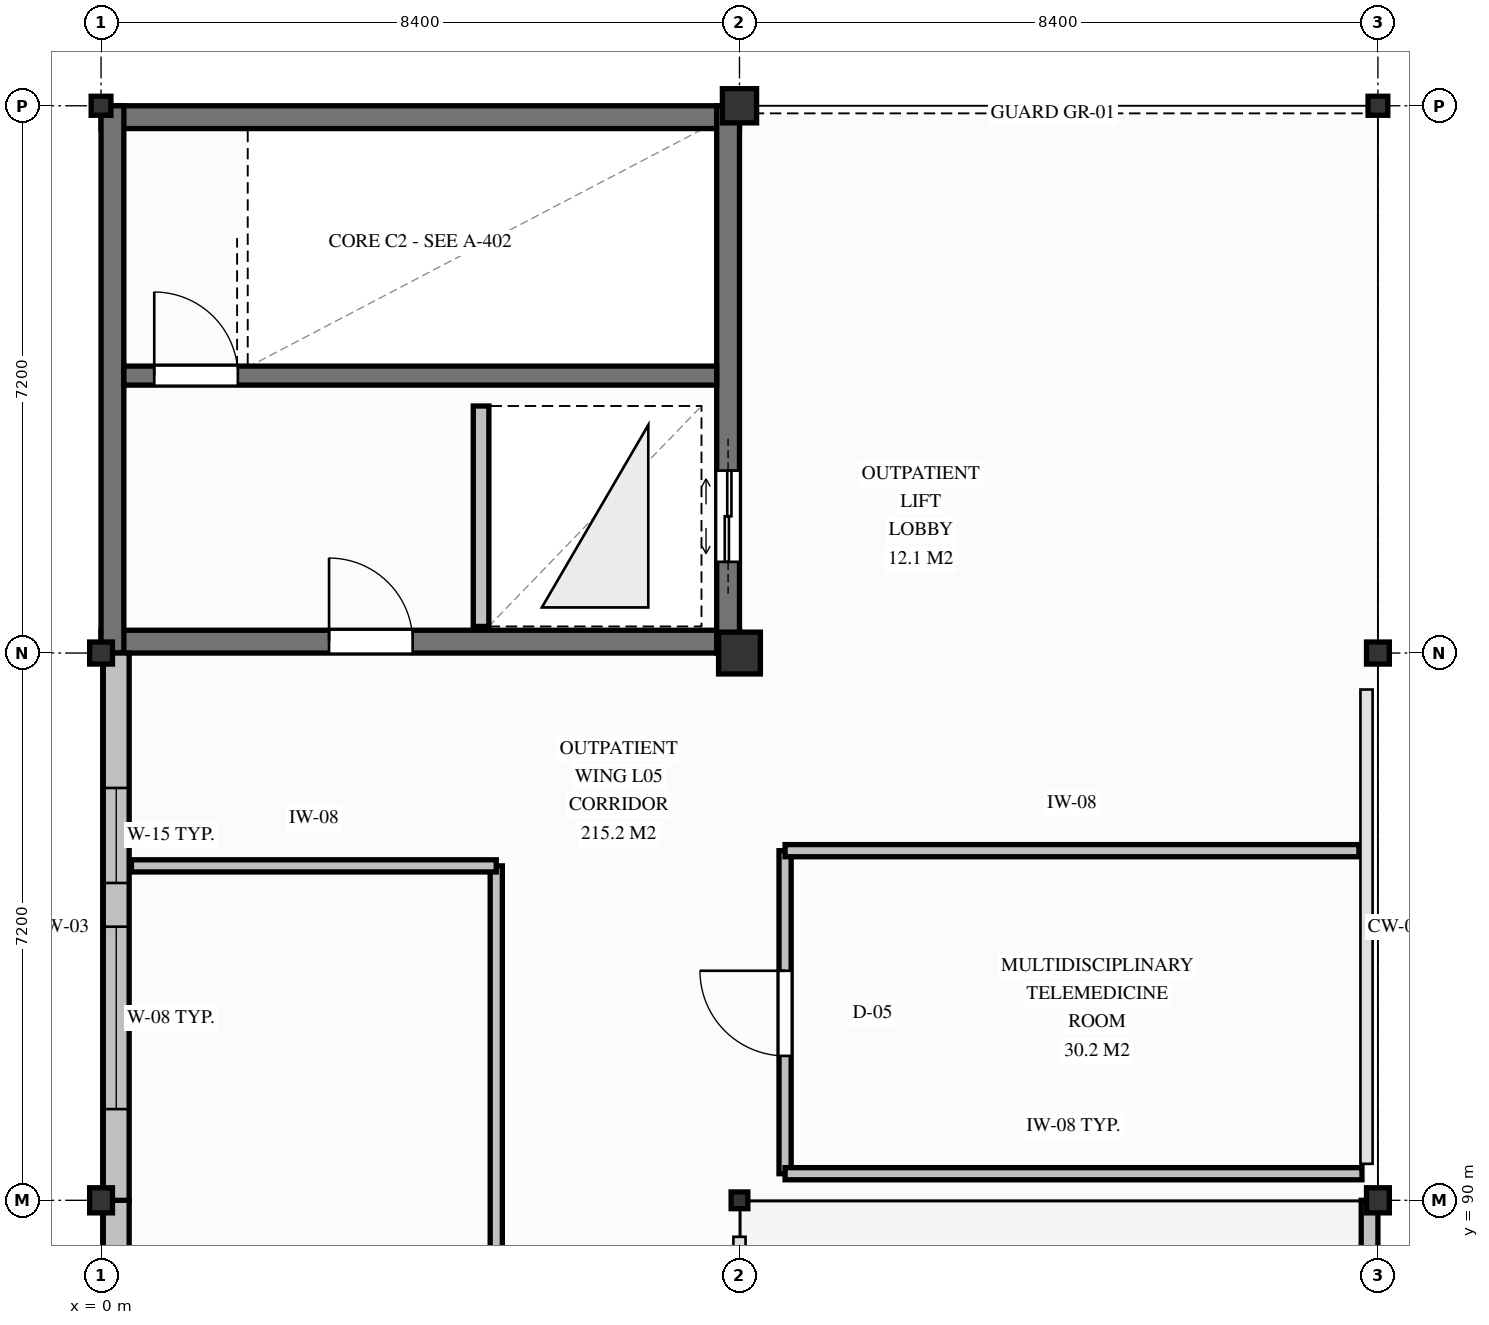
"""IFC4 building model, lengths in metres.
Left out: names, types, materials, properties, quantities, classifications, styles, units other than length and angle.
Written with IfcOpenShell. Run it as: python <this file> out.ifc"""

import sys

from ifc_helpers import new_model, si_unit, direction, frame, frame_2d, origin, origin_2d, place, context, subcontext, project, spatial, rectangle, hollow_rectangle, i_section, extrude, element, fill, save


model = new_model("IFC4")
c1 = context("Model", 3, precision=1e-05, world=origin(), true_north=direction((0.0, 1.0)))
c2 = subcontext(c1, "Body", "Model", "MODEL_VIEW")
j1 = project(units=[si_unit("LENGTHUNIT", "METRE"), si_unit("PLANEANGLEUNIT", "RADIAN")], contexts=[c1])
p1 = place(None, origin())
s1 = spatial("IfcSite", under=j1, at=p1, CompositionType="ELEMENT")
p2 = place(p1, origin())
s2 = spatial("IfcBuilding", under=s1, at=p2, CompositionType="ELEMENT")
p3 = place(p2, frame((0.0, 0.0, 21.3)))
s3 = spatial("IfcBuildingStorey", under=s2, at=p3, CompositionType="ELEMENT", Elevation=21.3)
p4 = place(p3, frame((0.0, 104.25, 0.0), z_axis=(0.0, 0.0, 1.0), x_axis=(1.0, 0.0, 0.0)))
e1 = element("IfcWall", 1, at=p4, inside=s3, PredefinedType="SHEAR", context=c2, shape_type="SweptSolid", body=[
    extrude(rectangle(XDim=8.4, YDim=0.3, at=frame_2d((4.2, 0.0))), origin(), (0.0, 0.0, 1.0), 5.15),
])
p5 = place(p3, frame((0.0, 97.35, 0.0), z_axis=(0.0, 0.0, 1.0), x_axis=(1.0, 0.0, 0.0)))
e2 = element("IfcWall", 2, at=p5, inside=s3, PredefinedType="SHEAR", context=c2, shape_type="SweptSolid", body=[
    extrude(rectangle(XDim=8.4, YDim=0.3, at=frame_2d((4.2, 0.0))), origin(), (0.0, 0.0, 1.0), 5.15),
])
p6 = place(p5, frame((3.0, 0.0, 0.0)))
e3 = element("IfcOpeningElement", 3, at=p6, cuts=e2, PredefinedType="OPENING", context=c2, shape_type="SweptSolid", body=[
    extrude(rectangle(XDim=1.1, YDim=2.15, at=frame_2d((0.55, 1.075))), frame((0.0, 0.16, 0.0), z_axis=(0.0, -1.0, 0.0), x_axis=(1.0, 0.0, 0.0)), (0.0, 0.0, 1.0), 0.32),
])
p7 = place(p3, frame((0.15, 97.2, 0.0), z_axis=(0.0, 0.0, 1.0), x_axis=(0.0, 1.0, 0.0)))
e4 = element("IfcWall", 4, at=p7, inside=s3, PredefinedType="SHEAR", context=c2, shape_type="SweptSolid", body=[
    extrude(rectangle(XDim=7.2, YDim=0.3, at=frame_2d((3.6, 0.0))), origin(), (0.0, 0.0, 1.0), 5.15),
])
p8 = place(p3, frame((8.25, 97.2, 0.0), z_axis=(0.0, 0.0, 1.0), x_axis=(0.0, 1.0, 0.0)))
e5 = element("IfcWall", 5, at=p8, inside=s3, PredefinedType="SHEAR", context=c2, shape_type="SweptSolid", body=[
    extrude(rectangle(XDim=7.2, YDim=0.3, at=frame_2d((3.6, 0.0))), origin(), (0.0, 0.0, 1.0), 5.15),
])
p9 = place(p8, frame((1.2, 0.0, 0.0)))
e6 = element("IfcOpeningElement", 6, at=p9, cuts=e5, PredefinedType="OPENING", context=c2, shape_type="SweptSolid", body=[
    extrude(rectangle(XDim=1.2, YDim=2.15, at=frame_2d((0.6, 1.075))), frame((0.0, 0.16, 0.0), z_axis=(0.0, -1.0, 0.0), x_axis=(1.0, 0.0, 0.0)), (0.0, 0.0, 1.0), 0.32),
])
p10 = place(p3, frame((0.3, 100.85, 0.0), z_axis=(0.0, 0.0, 1.0), x_axis=(1.0, 0.0, 0.0)))
e7 = element("IfcWall", 7, at=p10, inside=s3, PredefinedType="SHEAR", context=c2, shape_type="SweptSolid", body=[
    extrude(rectangle(XDim=7.8, YDim=0.25, at=frame_2d((3.9, 0.0))), origin(), (0.0, 0.0, 1.0), 5.15),
])
p11 = place(p10, frame((0.4, 0.0, 0.0)))
e8 = element("IfcOpeningElement", 8, at=p11, cuts=e7, PredefinedType="OPENING", context=c2, shape_type="SweptSolid", body=[
    extrude(rectangle(XDim=1.1, YDim=2.15, at=frame_2d((0.55, 1.075))), frame((0.0, 0.135, 0.0), z_axis=(0.0, -1.0, 0.0), x_axis=(1.0, 0.0, 0.0)), (0.0, 0.0, 1.0), 0.27),
])
p12 = place(p3, frame((0.0, 90.0, 0.0), z_axis=(0.0, 0.0, 1.0), x_axis=(1.0, 0.0, 0.0)))
e9 = element("IfcColumn", 9, at=p12, inside=s3, PredefinedType="COLUMN", context=c2, shape_type="SweptSolid", body=[
    extrude(i_section(OverallWidth=0.3, OverallDepth=0.33, WebThickness=0.01, FlangeThickness=0.017, FilletRadius=0.027, at=origin_2d()), origin(), (0.0, 0.0, 1.0), 4.05),
])
p13 = place(p3, frame((0.0, 97.2, 0.0), z_axis=(0.0, 0.0, 1.0), x_axis=(1.0, 0.0, 0.0)))
e10 = element("IfcColumn", 10, at=p13, inside=s3, PredefinedType="COLUMN", context=c2, shape_type="SweptSolid", body=[
    extrude(i_section(OverallWidth=0.3, OverallDepth=0.29, WebThickness=0.009, FlangeThickness=0.014, FilletRadius=0.027, at=origin_2d()), origin(), (0.0, 0.0, 1.0), 4.05),
])
p14 = place(p3, frame((0.0, 104.4, 0.0), z_axis=(0.0, 0.0, 1.0), x_axis=(1.0, 0.0, 0.0)))
e11 = element("IfcColumn", 11, at=p14, inside=s3, PredefinedType="COLUMN", context=c2, shape_type="SweptSolid", body=[
    extrude(i_section(OverallWidth=0.26, OverallDepth=0.25, WebThickness=0.008, FlangeThickness=0.012, FilletRadius=0.024, at=origin_2d()), origin(), (0.0, 0.0, 1.0), 4.05),
])
p15 = place(p3, frame((8.4, 90.0, 0.0), z_axis=(0.0, 0.0, 1.0), x_axis=(1.0, 0.0, 0.0)))
e12 = element("IfcColumn", 12, at=p15, inside=s3, PredefinedType="COLUMN", context=c2, shape_type="SweptSolid", body=[
    extrude(hollow_rectangle(XDim=0.22, YDim=0.22, WallThickness=0.012, InnerFilletRadius=0.019, OuterFilletRadius=0.031, at=origin_2d()), origin(), (0.0, 0.0, 1.0), 4.05),
])
p16 = place(p3, frame((8.4, 97.2, 0.0), z_axis=(0.0, 0.0, 1.0), x_axis=(1.0, 0.0, 0.0)))
e13 = element("IfcColumn", 13, at=p16, inside=s3, PredefinedType="COLUMN", context=c2, shape_type="SweptSolid", body=[
    extrude(rectangle(XDim=0.55, YDim=0.55, at=origin_2d()), origin(), (0.0, 0.0, 1.0), 4.05),
])
p17 = place(p3, frame((8.4, 104.4, 0.0), z_axis=(0.0, 0.0, 1.0), x_axis=(1.0, 0.0, 0.0)))
e14 = element("IfcColumn", 14, at=p17, inside=s3, PredefinedType="COLUMN", context=c2, shape_type="SweptSolid", body=[
    extrude(rectangle(XDim=0.45, YDim=0.45, at=origin_2d()), origin(), (0.0, 0.0, 1.0), 4.05),
])
p18 = place(p3, frame((16.8, 90.0, 0.0), z_axis=(0.0, 0.0, 1.0), x_axis=(1.0, 0.0, 0.0)))
e15 = element("IfcColumn", 15, at=p18, inside=s3, PredefinedType="COLUMN", context=c2, shape_type="SweptSolid", body=[
    extrude(i_section(OverallWidth=0.3, OverallDepth=0.33, WebThickness=0.01, FlangeThickness=0.017, FilletRadius=0.027, at=origin_2d()), origin(), (0.0, 0.0, 1.0), 4.05),
])
p19 = place(p3, frame((16.8, 97.2, 0.0), z_axis=(0.0, 0.0, 1.0), x_axis=(1.0, 0.0, 0.0)))
e16 = element("IfcColumn", 16, at=p19, inside=s3, PredefinedType="COLUMN", context=c2, shape_type="SweptSolid", body=[
    extrude(i_section(OverallWidth=0.3, OverallDepth=0.29, WebThickness=0.009, FlangeThickness=0.014, FilletRadius=0.027, at=origin_2d()), origin(), (0.0, 0.0, 1.0), 4.05),
])
p20 = place(p3, frame((16.8, 104.4, 0.0), z_axis=(0.0, 0.0, 1.0), x_axis=(1.0, 0.0, 0.0)))
e17 = element("IfcColumn", 17, at=p20, inside=s3, PredefinedType="COLUMN", context=c2, shape_type="SweptSolid", body=[
    extrude(i_section(OverallWidth=0.26, OverallDepth=0.25, WebThickness=0.008, FlangeThickness=0.012, FilletRadius=0.024, at=origin_2d()), origin(), (0.0, 0.0, 1.0), 4.05),
])
p21 = place(p3, frame((0.2, 82.8, 0.0), z_axis=(0.0, 0.0, 1.0), x_axis=(0.0, 1.0, 0.0)))
e18 = element("IfcWall", 18, at=p21, inside=s3, PredefinedType="SOLIDWALL", context=c2, shape_type="SweptSolid", body=[
    extrude(rectangle(XDim=7.2, YDim=0.34, at=frame_2d((3.6, 0.0))), origin(), (0.0, 0.0, 1.0), 3.338),
])
p22 = place(p21, frame((1.35, 0.0, 0.85)))
e19 = element("IfcOpeningElement", 19, at=p22, cuts=e18, PredefinedType="OPENING", context=c2, shape_type="SweptSolid", body=[
    extrude(rectangle(XDim=2.1, YDim=2.0, at=frame_2d((1.05, 1.0))), frame((0.0, 0.18, 0.0), z_axis=(0.0, -1.0, 0.0), x_axis=(1.0, 0.0, 0.0)), (0.0, 0.0, 1.0), 0.36),
])
p23 = place(p3, frame((0.2, 90.0, 0.0), z_axis=(0.0, 0.0, 1.0), x_axis=(0.0, 1.0, 0.0)))
e20 = element("IfcWall", 20, at=p23, inside=s3, PredefinedType="SOLIDWALL", context=c2, shape_type="SweptSolid", body=[
    extrude(rectangle(XDim=7.2, YDim=0.34, at=frame_2d((3.6, 0.0))), origin(), (0.0, 0.0, 1.0), 3.338),
])
p24 = place(p23, frame((1.2, 0.0, 0.85)))
e21 = element("IfcOpeningElement", 21, at=p24, cuts=e20, PredefinedType="OPENING", context=c2, shape_type="SweptSolid", body=[
    extrude(rectangle(XDim=2.4, YDim=2.05, at=frame_2d((1.2, 1.025))), frame((0.0, 0.18, 0.0), z_axis=(0.0, -1.0, 0.0), x_axis=(1.0, 0.0, 0.0)), (0.0, 0.0, 1.0), 0.36),
])
p25 = place(p23, frame((4.175, 0.0, 0.85)))
e22 = element("IfcOpeningElement", 22, at=p25, cuts=e20, PredefinedType="OPENING", context=c2, shape_type="SweptSolid", body=[
    extrude(rectangle(XDim=1.25, YDim=1.5, at=frame_2d((0.625, 0.75))), frame((0.0, 0.18, 0.0), z_axis=(0.0, -1.0, 0.0), x_axis=(1.0, 0.0, 0.0)), (0.0, 0.0, 1.0), 0.36),
])
p26 = place(p3, frame((5.0, 97.55, 0.0), z_axis=(0.0, 0.0, 1.0), x_axis=(0.0, 1.0, 0.0)))
e23 = element("IfcWall", 23, at=p26, inside=s3, PredefinedType="PARTITIONING", context=c2, shape_type="SweptSolid", body=[
    extrude(rectangle(XDim=2.9, YDim=0.205, at=frame_2d((1.45, 0.0))), origin(), (0.0, 0.0, 1.0), 3.78),
])
p27 = place(p3, frame((9.0, 90.35, 0.0), z_axis=(0.0, 0.0, 1.0), x_axis=(0.0, 1.0, 0.0)))
e24 = element("IfcWall", 24, at=p27, inside=s3, PredefinedType="PARTITIONING", context=c2, shape_type="SweptSolid", body=[
    extrude(rectangle(XDim=4.25, YDim=0.16, at=frame_2d((2.125, 0.0))), origin(), (0.0, 0.0, 1.0), 3.78),
])
p28 = place(p27, frame((1.55, 0.0, 0.0)))
e25 = element("IfcOpeningElement", 25, at=p28, cuts=e24, PredefinedType="OPENING", context=c2, shape_type="SweptSolid", body=[
    extrude(rectangle(XDim=1.12, YDim=2.18, at=frame_2d((0.56, 1.09))), frame((0.0, 0.09, 0.0), z_axis=(0.0, -1.0, 0.0), x_axis=(1.0, 0.0, 0.0)), (0.0, 0.0, 1.0), 0.18),
])
p29 = place(p3, frame((9.0, 90.35, 0.0), z_axis=(0.0, 0.0, 1.0), x_axis=(1.0, 0.0, 0.0)))
e26 = element("IfcWall", 26, at=p29, inside=s3, PredefinedType="PARTITIONING", context=c2, shape_type="SweptSolid", body=[
    extrude(rectangle(XDim=7.59, YDim=0.16, at=frame_2d((3.795, 0.0))), origin(), (0.0, 0.0, 1.0), 3.498),
])
p30 = place(p3, frame((9.0, 94.6, 0.0), z_axis=(0.0, 0.0, 1.0), x_axis=(1.0, 0.0, 0.0)))
e27 = element("IfcWall", 27, at=p30, inside=s3, PredefinedType="PARTITIONING", context=c2, shape_type="SweptSolid", body=[
    extrude(rectangle(XDim=7.55, YDim=0.16, at=frame_2d((3.775, 0.0))), origin(), (0.0, 0.0, 1.0), 3.498),
])
p31 = place(p3, frame((5.2, 94.4, 0.0), z_axis=(0.0, 0.0, 1.0), x_axis=(0.0, -1.0, 0.0)))
e28 = element("IfcWall", 28, at=p31, inside=s3, PredefinedType="PARTITIONING", context=c2, shape_type="SweptSolid", body=[
    extrude(rectangle(XDim=22.335, YDim=0.16, at=frame_2d((11.167, 0.0))), origin(), (0.0, 0.0, 1.0), 3.328),
])
p32 = place(p31, frame((10.45, 0.0, 0.0)))
e29 = element("IfcOpeningElement", 29, at=p32, cuts=e28, PredefinedType="OPENING", context=c2, shape_type="SweptSolid", body=[
    extrude(rectangle(XDim=1.28, YDim=2.22, at=frame_2d((0.64, 1.11))), frame((0.0, 0.09, 0.0), z_axis=(0.0, -1.0, 0.0), x_axis=(1.0, 0.0, 0.0)), (0.0, 0.0, 1.0), 0.18),
])
p33 = place(p3, frame((0.4, 94.4, 0.0), z_axis=(0.0, 0.0, 1.0), x_axis=(1.0, 0.0, 0.0)))
e30 = element("IfcWall", 30, at=p33, inside=s3, PredefinedType="PARTITIONING", context=c2, shape_type="SweptSolid", body=[
    extrude(rectangle(XDim=4.8, YDim=0.16, at=frame_2d((2.4, 0.0))), origin(), (0.0, 0.0, 1.0), 3.78),
])
p34 = place(p3, frame((16.69, 66.8, 0.0), z_axis=(0.0, 0.0, 1.0), x_axis=(0.0, 1.0, 0.0)))
e31 = element("IfcWall", 31, at=p34, inside=s3, PredefinedType="PARAPET", context=c2, shape_type="SweptSolid", body=[
    extrude(rectangle(XDim=23.2, YDim=0.22, at=frame_2d((11.6, 0.0))), origin(), (0.0, 0.0, 1.0), 1.12),
])
p35 = place(p24, origin())
e32 = element("IfcWindow", 32, at=p35, inside=s3, PartitioningType="SINGLE_PANEL", PredefinedType="WINDOW", context=c2, shape_type="SweptSolid", body=[
    extrude(rectangle(XDim=2.4, YDim=2.05, at=frame_2d((1.2, 1.025))), frame((0.0, 0.03, 0.0), z_axis=(0.0, -1.0, 0.0), x_axis=(1.0, 0.0, 0.0)), (0.0, 0.0, 1.0), 0.06),
])
fill(e21, e32)
p36 = place(p25, origin())
e33 = element("IfcWindow", 33, at=p36, inside=s3, PartitioningType="SINGLE_PANEL", PredefinedType="WINDOW", context=c2, shape_type="SweptSolid", body=[
    extrude(rectangle(XDim=1.25, YDim=1.5, at=frame_2d((0.625, 0.75))), frame((0.0, 0.03, 0.0), z_axis=(0.0, -1.0, 0.0), x_axis=(1.0, 0.0, 0.0)), (0.0, 0.0, 1.0), 0.06),
])
fill(e22, e33)
p37 = place(p11, origin())
e34 = element("IfcDoor", 34, at=p37, inside=s3, OperationType="SINGLE_SWING_LEFT", PredefinedType="DOOR", context=c2, shape_type="SweptSolid", body=[
    extrude(rectangle(XDim=1.1, YDim=2.15, at=frame_2d((0.55, 1.075))), frame((0.0, 0.025, 0.0), z_axis=(0.0, -1.0, 0.0), x_axis=(1.0, 0.0, 0.0)), (0.0, 0.0, 1.0), 0.05),
])
fill(e8, e34)
p38 = place(p6, origin())
e35 = element("IfcDoor", 35, at=p38, inside=s3, OperationType="SINGLE_SWING_LEFT", PredefinedType="DOOR", context=c2, shape_type="SweptSolid", body=[
    extrude(rectangle(XDim=1.1, YDim=2.15, at=frame_2d((0.55, 1.075))), frame((0.0, 0.025, 0.0), z_axis=(0.0, -1.0, 0.0), x_axis=(1.0, 0.0, 0.0)), (0.0, 0.0, 1.0), 0.05),
])
fill(e3, e35)
p39 = place(p9, origin())
e36 = element("IfcDoor", 36, at=p39, inside=s3, OperationType="DOUBLE_DOOR_SLIDING", PredefinedType="DOOR", context=c2, shape_type="SweptSolid", body=[
    extrude(rectangle(XDim=1.2, YDim=2.15, at=frame_2d((0.6, 1.075))), frame((0.0, 0.025, 0.0), z_axis=(0.0, -1.0, 0.0), x_axis=(1.0, 0.0, 0.0)), (0.0, 0.0, 1.0), 0.05),
])
fill(e6, e36)
p40 = place(p28, origin())
e37 = element("IfcDoor", 37, at=p40, inside=s3, OperationType="SINGLE_SWING_RIGHT", PredefinedType="DOOR", context=c2, shape_type="SweptSolid", body=[
    extrude(rectangle(XDim=1.12, YDim=2.18, at=frame_2d((0.56, 1.09))), frame((0.0, 0.025, 0.0), z_axis=(0.0, -1.0, 0.0), x_axis=(1.0, 0.0, 0.0)), (0.0, 0.0, 1.0), 0.05),
])
fill(e25, e37)
save(model, sys.argv[1])
